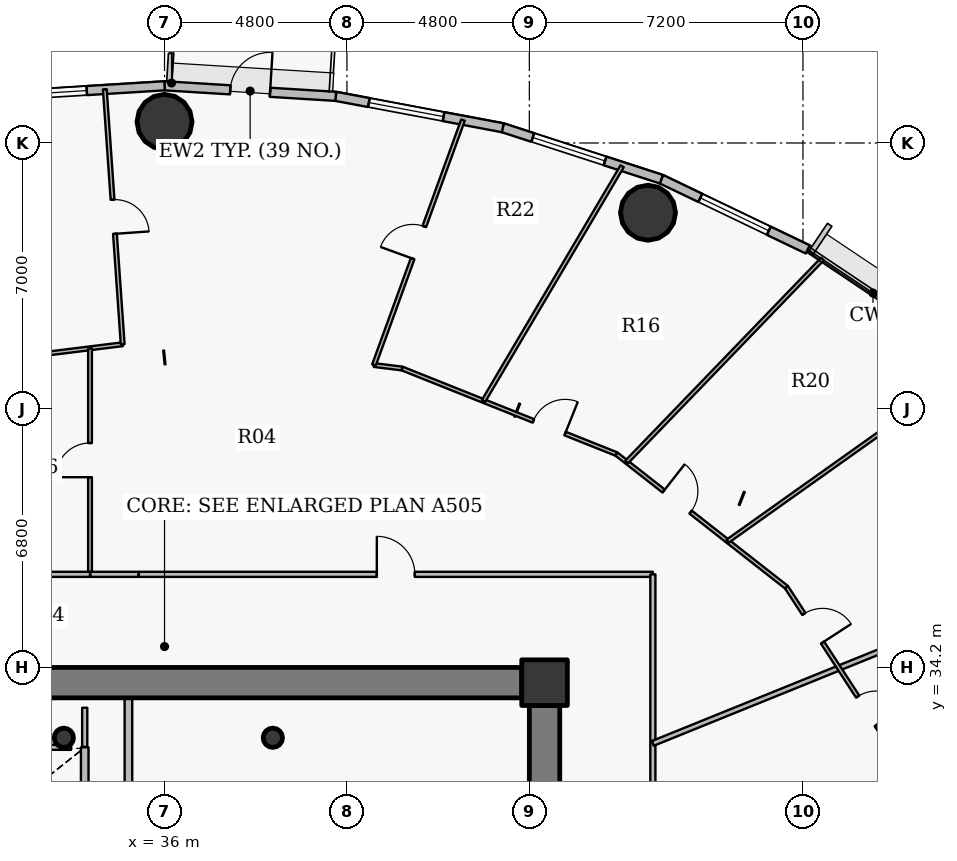
"""IFC4 building model, lengths in metres.
Left out: names, types, materials, properties, quantities, classifications, styles, units other than length and angle.
Written with IfcOpenShell. Run it as: python <this file> out.ifc"""

import sys

from ifc_helpers import new_model, si_unit, direction, frame, frame_2d, origin, origin_2d, place, context, subcontext, project, spatial, rectangle, hollow_circle, extrude, source, transform, mapped, element, fill, save


model = new_model("IFC4")
c1 = context("Model", 3, precision=1e-05, world=origin(), true_north=direction((0.0, 1.0)))
c2 = subcontext(c1, "Body", "Model", "MODEL_VIEW")
j1 = project(units=[si_unit("LENGTHUNIT", "METRE"), si_unit("PLANEANGLEUNIT", "RADIAN")], contexts=[c1])
p1 = place(None, origin())
s1 = spatial("IfcSite", under=j1, at=p1, CompositionType="ELEMENT")
p2 = place(p1, origin())
s2 = spatial("IfcBuilding", under=s1, at=p2, CompositionType="ELEMENT")
p3 = place(p2, frame((0.0, 0.0, 130.95)))
s3 = spatial("IfcBuildingStorey", under=s2, at=p3, CompositionType="ELEMENT", Elevation=130.95)
p4 = place(p3, frame((46.0, 33.8, 0.0), z_axis=(0.0, 0.0, 1.0), x_axis=(1.0, 0.0, 0.0)))
e1 = element("IfcColumn", 1, at=p4, inside=s3, PredefinedType="COLUMN", context=c2, shape_type="SweptSolid", body=[
    extrude(rectangle(XDim=1.2, YDim=1.2, at=origin_2d()), origin(), (0.0, 0.0, 1.0), 3.75),
])
for number, where, z_axis, x_axis in (
    (2, (38.85, 32.35, 0.0), (0.0, 0.0, 1.0), (1.0, 0.0, 0.0)),
    (3, (33.35, 32.35, 0.0), (0.0, 0.0, 1.0), (1.0, 0.0, 0.0)),
):
    element("IfcColumn", number, at=place(p3, frame(where, z_axis=z_axis, x_axis=x_axis)), inside=s3, PredefinedType="COLUMN", context=c2, shape_type="SweptSolid", body=[
        extrude(hollow_circle(Radius=0.254, WallThickness=0.02, at=origin_2d()), origin(), (0.0, 0.0, 1.0), 3.75),
    ])
p5 = place(p3, frame((26.6, 33.8, 0.0), z_axis=(0.0, 0.0, 1.0), x_axis=(1.0, 0.0, 0.0)))
e4 = element("IfcWall", 4, at=p5, inside=s3, PredefinedType="SHEAR", context=c2, shape_type="SweptSolid", body=[
    extrude(rectangle(XDim=18.8, YDim=0.8, at=frame_2d((9.4, 0.0))), origin(), (0.0, 0.0, 1.0), 2.95),
])
p6 = place(p3, frame((46.0, 33.2, 0.0), z_axis=(0.0, 0.0, 1.0), x_axis=(0.0, -1.0, 0.0)))
e5 = element("IfcWall", 5, at=p6, inside=s3, PredefinedType="SHEAR", context=c2, shape_type="SweptSolid", body=[
    extrude(rectangle(XDim=12.4, YDim=0.8, at=frame_2d((6.2, 0.0))), origin(), (0.0, 0.0, 1.0), 2.95),
])
p7 = place(p6, frame((5.79, 0.0, 0.0)))
e6 = element("IfcOpeningElement", 6, at=p7, cuts=e5, PredefinedType="OPENING", context=c2, shape_type="SweptSolid", body=[
    extrude(rectangle(XDim=0.82, YDim=2.1, at=origin_2d()), frame((0.41, 0.41, 1.05), z_axis=(0.0, -1.0, 0.0), x_axis=(1.0, 0.0, 0.0)), (0.0, 0.0, 1.0), 0.82),
])
for number, where, z_axis, x_axis in (
    (7, (48.722, 46.165, 0.0), (0.0, 0.0, 1.0), (1.0, 0.0, 0.0)),
    (8, (36.0, 48.555, 0.0), (0.0, 0.0, 1.0), (1.0, 0.0, 0.0)),
):
    element("IfcColumn", number, at=place(p3, frame(where, z_axis=z_axis, x_axis=x_axis)), inside=s3, PredefinedType="COLUMN", context=c2, shape_type="SweptSolid", body=[
        extrude(hollow_circle(Radius=0.725, WallThickness=0.042, at=origin_2d()), origin(), (0.0, 0.0, 1.0), 3.75),
    ])
p8 = place(p3, frame((49.074, 47.047, 0.0), z_axis=(0.0, 0.0, 1.0), x_axis=(0.901589935876, -0.432591709962, 0.0)))
e9 = element("IfcWall", 9, at=p8, inside=s3, PredefinedType="SOLIDWALL", context=c2, shape_type="SweptSolid", body=[
    extrude(rectangle(XDim=4.272, YDim=0.24, at=frame_2d((2.136, 0.0))), origin(), (0.0, 0.0, 1.0), 3.5),
])
p9 = place(p8, frame((1.136, 0.0, 0.9)))
e10 = element("IfcOpeningElement", 10, at=p9, cuts=e9, PredefinedType="OPENING", context=c2, shape_type="SweptSolid", body=[
    extrude(rectangle(XDim=2.0, YDim=1.75, at=origin_2d()), frame((1.0, 0.13, 0.875), z_axis=(0.0, -1.0, 0.0), x_axis=(1.0, 0.0, 0.0)), (0.0, 0.0, 1.0), 0.26),
])
p10 = place(p3, frame((44.9, 48.401, 0.0), z_axis=(0.0, 0.0, 1.0), x_axis=(0.951211346073, -0.308540070495, 0.0)))
e11 = element("IfcWall", 11, at=p10, inside=s3, PredefinedType="SOLIDWALL", context=c2, shape_type="SweptSolid", body=[
    extrude(rectangle(XDim=4.388, YDim=0.24, at=frame_2d((2.194, 0.0))), origin(), (0.0, 0.0, 1.0), 3.5),
])
p11 = place(p10, frame((0.83, 0.0, 0.9)))
e12 = element("IfcOpeningElement", 12, at=p11, cuts=e11, PredefinedType="OPENING", context=c2, shape_type="SweptSolid", body=[
    extrude(rectangle(XDim=2.0, YDim=1.75, at=origin_2d()), frame((1.0, 0.13, 0.875), z_axis=(0.0, -1.0, 0.0), x_axis=(1.0, 0.0, 0.0)), (0.0, 0.0, 1.0), 0.26),
])
p12 = place(p3, frame((40.506, 49.227, 0.0), z_axis=(0.0, 0.0, 1.0), x_axis=(0.982789252177, -0.184730305596, 0.0)))
e13 = element("IfcWall", 13, at=p12, inside=s3, PredefinedType="SOLIDWALL", context=c2, shape_type="SweptSolid", body=[
    extrude(rectangle(XDim=4.471, YDim=0.24, at=frame_2d((2.235, 0.0))), origin(), (0.0, 0.0, 1.0), 3.5),
])
p13 = place(p12, frame((0.886, 0.0, 0.9)))
e14 = element("IfcOpeningElement", 14, at=p13, cuts=e13, PredefinedType="OPENING", context=c2, shape_type="SweptSolid", body=[
    extrude(rectangle(XDim=2.0, YDim=1.75, at=origin_2d()), frame((1.0, 0.13, 0.875), z_axis=(0.0, -1.0, 0.0), x_axis=(1.0, 0.0, 0.0)), (0.0, 0.0, 1.0), 0.26),
])
p14 = place(p3, frame((36.0, 49.505, 0.0), z_axis=(0.0, 0.0, 1.0), x_axis=(0.998107531589, -0.061492726276, 0.0)))
e15 = element("IfcWall", 15, at=p14, inside=s3, PredefinedType="SOLIDWALL", context=c2, shape_type="SweptSolid", body=[
    extrude(rectangle(XDim=4.514, YDim=0.24, at=frame_2d((2.257, 0.0))), origin(), (0.0, 0.0, 1.0), 3.5),
])
p15 = place(p14, frame((1.732, 0.0, 0.0)))
e16 = element("IfcOpeningElement", 16, at=p15, cuts=e15, PredefinedType="OPENING", context=c2, shape_type="SweptSolid", body=[
    extrude(rectangle(XDim=1.05, YDim=2.15, at=origin_2d()), frame((0.525, 0.13, 1.075), z_axis=(0.0, -1.0, 0.0), x_axis=(1.0, 0.0, 0.0)), (0.0, 0.0, 1.0), 0.26),
])
p16 = place(p3, frame((31.494, 49.227, 0.0), z_axis=(0.0, 0.0, 1.0), x_axis=(0.998107531589, 0.061492726276, 0.0)))
e17 = element("IfcWall", 17, at=p16, inside=s3, PredefinedType="SOLIDWALL", context=c2, shape_type="SweptSolid", body=[
    extrude(rectangle(XDim=4.514, YDim=0.24, at=frame_2d((2.257, 0.0))), origin(), (0.0, 0.0, 1.0), 3.5),
])
p17 = place(p16, frame((0.865, 0.0, 0.9)))
e18 = element("IfcOpeningElement", 18, at=p17, cuts=e17, PredefinedType="OPENING", context=c2, shape_type="SweptSolid", body=[
    extrude(rectangle(XDim=1.6, YDim=1.75, at=origin_2d()), frame((0.8, 0.13, 0.875), z_axis=(0.0, -1.0, 0.0), x_axis=(1.0, 0.0, 0.0)), (0.0, 0.0, 1.0), 0.26),
])
p18 = place(p3, frame((23.15, 36.65, 0.0), z_axis=(0.0, 0.0, 1.0), x_axis=(1.0, 0.0, 0.0)))
e19 = element("IfcWall", 19, at=p18, inside=s3, PredefinedType="PARTITIONING", context=c2, shape_type="SweptSolid", body=[
    extrude(rectangle(XDim=10.889, YDim=0.135, at=frame_2d((5.445, 0.0))), origin(), (0.0, 0.0, 1.0), 2.935),
])
p19 = place(p18, frame((3.354, 0.0, 0.0)))
e20 = element("IfcOpeningElement", 20, at=p19, cuts=e19, PredefinedType="OPENING", context=c2, shape_type="SweptSolid", body=[
    extrude(rectangle(XDim=1.05, YDim=2.15, at=origin_2d()), frame((0.525, 0.078, 1.075), z_axis=(0.0, -1.0, 0.0), x_axis=(1.0, 0.0, 0.0)), (0.0, 0.0, 1.0), 0.155),
])
p20 = place(p3, frame((29.749, 42.066, 0.0), z_axis=(0.0, 0.0, 1.0), x_axis=(0.992399697935, 0.123056245428, 0.0)))
e21 = element("IfcWall", 21, at=p20, inside=s3, PredefinedType="PARTITIONING", context=c2, shape_type="SweptSolid", body=[
    extrude(rectangle(XDim=5.19, YDim=0.1, at=frame_2d((2.595, 0.0))), origin(), (0.0, 0.0, 1.0), 2.935),
])
p21 = place(p3, frame((33.9, 20.6, 0.0), z_axis=(0.0, 0.0, 1.0), x_axis=(0.0, 1.0, 0.0)))
e22 = element("IfcWall", 22, at=p21, inside=s3, PredefinedType="PARTITIONING", context=c2, shape_type="SweptSolid", body=[
    extrude(rectangle(XDim=11.5, YDim=0.2, at=frame_2d((5.75, 0.0))), origin(), (0.0, 0.0, 1.0), 3.085),
])
p22 = place(p3, frame((34.039, 36.714, 0.0), z_axis=(0.0, 0.0, 1.0), x_axis=(0.0, 1.0, 0.0)))
e23 = element("IfcWall", 23, at=p22, inside=s3, PredefinedType="PARTITIONING", context=c2, shape_type="SweptSolid", body=[
    extrude(rectangle(XDim=5.884, YDim=0.1, at=frame_2d((2.942, 0.0))), origin(), (0.0, 0.0, 1.0), 2.985),
])
p23 = place(p22, frame((2.492, 0.0, 0.0)))
e24 = element("IfcOpeningElement", 24, at=p23, cuts=e23, PredefinedType="OPENING", context=c2, shape_type="SweptSolid", body=[
    extrude(rectangle(XDim=0.9, YDim=2.1, at=origin_2d()), frame((0.45, 0.06, 1.05), z_axis=(0.0, -1.0, 0.0), x_axis=(1.0, 0.0, 0.0)), (0.0, 0.0, 1.0), 0.12),
])
p24 = place(p3, frame((34.429, 49.413, 0.0), z_axis=(0.0, 0.0, 1.0), x_axis=(0.069954481801, -0.99755018444, 0.0)))
e25 = element("IfcWall", 25, at=p24, inside=s3, PredefinedType="PARTITIONING", context=c2, shape_type="SweptSolid", body=[
    extrude(rectangle(XDim=6.725, YDim=0.1, at=frame_2d((3.363, 0.0))), origin(), (0.0, 0.0, 1.0), 2.935),
])
p25 = place(p24, frame((2.913, 0.0, 0.0)))
e26 = element("IfcOpeningElement", 26, at=p25, cuts=e25, PredefinedType="OPENING", context=c2, shape_type="SweptSolid", body=[
    extrude(rectangle(XDim=0.9, YDim=2.1, at=origin_2d()), frame((0.45, 0.06, 1.05), z_axis=(0.0, -1.0, 0.0), x_axis=(1.0, 0.0, 0.0)), (0.0, 0.0, 1.0), 0.12),
])
p26 = place(p3, frame((35.05, 31.05, 0.0), z_axis=(0.0, 0.0, 1.0), x_axis=(0.0, 1.0, 0.0)))
e27 = element("IfcWall", 27, at=p26, inside=s3, PredefinedType="PARTITIONING", context=c2, shape_type="SweptSolid", body=[
    extrude(rectangle(XDim=2.35, YDim=0.2, at=frame_2d((1.175, 0.0))), origin(), (0.0, 0.0, 1.0), 3.085),
])
p27 = place(p3, frame((35.323, 36.65, 0.0), z_axis=(0.0, 0.0, 1.0), x_axis=(1.0, 0.0, 0.0)))
e28 = element("IfcWall", 28, at=p27, inside=s3, PredefinedType="PARTITIONING", context=c2, shape_type="SweptSolid", body=[
    extrude(rectangle(XDim=13.527, YDim=0.135, at=frame_2d((6.763, 0.0))), origin(), (0.0, 0.0, 1.0), 2.935),
])
p28 = place(p27, frame((6.263, 0.0, 0.0)))
e29 = element("IfcOpeningElement", 29, at=p28, cuts=e28, PredefinedType="OPENING", context=c2, shape_type="SweptSolid", body=[
    extrude(rectangle(XDim=1.0, YDim=2.15, at=origin_2d()), frame((0.5, 0.078, 1.075), z_axis=(0.0, -1.0, 0.0), x_axis=(1.0, 0.0, 0.0)), (0.0, 0.0, 1.0), 0.155),
])
p29 = place(p3, frame((41.511, 42.157, 0.0), z_axis=(0.0, 0.0, 1.0), x_axis=(0.992403212837, -0.123027895822, 0.0)))
e30 = element("IfcWall", 30, at=p29, inside=s3, PredefinedType="PARTITIONING", context=c2, shape_type="SweptSolid", body=[
    extrude(rectangle(XDim=0.746, YDim=0.1, at=frame_2d((0.373, 0.0))), origin(), (0.0, 0.0, 1.0), 3.5),
])
p30 = place(p3, frame((41.511, 42.157, 0.0), z_axis=(0.0, 0.0, 1.0), x_axis=(0.341680179237, 0.939816287961, 0.0)))
e31 = element("IfcWall", 31, at=p30, inside=s3, PredefinedType="PARTITIONING", context=c2, shape_type="SweptSolid", body=[
    extrude(rectangle(XDim=6.858, YDim=0.1, at=frame_2d((3.429, 0.0))), origin(), (0.0, 0.0, 1.0), 2.935),
])
p31 = place(p30, frame((2.979, 0.0, 0.0)))
e32 = element("IfcOpeningElement", 32, at=p31, cuts=e31, PredefinedType="OPENING", context=c2, shape_type="SweptSolid", body=[
    extrude(rectangle(XDim=0.9, YDim=2.1, at=origin_2d()), frame((0.45, 0.06, 1.05), z_axis=(0.0, -1.0, 0.0), x_axis=(1.0, 0.0, 0.0)), (0.0, 0.0, 1.0), 0.12),
])
p32 = place(p3, frame((42.251, 42.066, 0.0), z_axis=(0.0, 0.0, 1.0), x_axis=(0.928803554156, -0.370572473055, 0.0)))
e33 = element("IfcWall", 33, at=p32, inside=s3, PredefinedType="PARTITIONING", context=c2, shape_type="SweptSolid", body=[
    extrude(rectangle(XDim=6.072, YDim=0.1, at=frame_2d((3.036, 0.0))), origin(), (0.0, 0.0, 1.0), 2.935),
])
p33 = place(p32, frame((3.719, 0.0, 0.0)))
e34 = element("IfcOpeningElement", 34, at=p33, cuts=e33, PredefinedType="OPENING", context=c2, shape_type="SweptSolid", body=[
    extrude(rectangle(XDim=0.9, YDim=2.1, at=origin_2d()), frame((0.45, 0.06, 1.05), z_axis=(0.0, -1.0, 0.0), x_axis=(1.0, 0.0, 0.0)), (0.0, 0.0, 1.0), 0.12),
])
p34 = place(p3, frame((44.394, 41.211, 0.0), z_axis=(0.0, 0.0, 1.0), x_axis=(0.508542397454, 0.861036950422, 0.0)))
e35 = element("IfcWall", 35, at=p34, inside=s3, PredefinedType="PARTITIONING", context=c2, shape_type="SweptSolid", body=[
    extrude(rectangle(XDim=7.173, YDim=0.1, at=frame_2d((3.587, 0.0))), origin(), (0.0, 0.0, 1.0), 2.935),
])
p35 = place(p3, frame((47.891, 39.816, 0.0), z_axis=(0.0, 0.0, 1.0), x_axis=(0.787345480673, -0.616512038864, 0.0)))
e36 = element("IfcWall", 36, at=p35, inside=s3, PredefinedType="PARTITIONING", context=c2, shape_type="SweptSolid", body=[
    extrude(rectangle(XDim=5.685, YDim=0.1, at=frame_2d((2.843, 0.0))), origin(), (0.0, 0.0, 1.0), 2.935),
])
p36 = place(p35, frame((1.58, 0.0, 0.0)))
e37 = element("IfcOpeningElement", 37, at=p36, cuts=e36, PredefinedType="OPENING", context=c2, shape_type="SweptSolid", body=[
    extrude(rectangle(XDim=0.9, YDim=2.1, at=origin_2d()), frame((0.45, 0.06, 1.05), z_axis=(0.0, -1.0, 0.0), x_axis=(1.0, 0.0, 0.0)), (0.0, 0.0, 1.0), 0.12),
])
p37 = place(p3, frame((48.16, 39.605, 0.0), z_axis=(0.0, 0.0, 1.0), x_axis=(0.694278615756, 0.719706331571, 0.0)))
e38 = element("IfcWall", 38, at=p37, inside=s3, PredefinedType="PARTITIONING", context=c2, shape_type="SweptSolid", body=[
    extrude(rectangle(XDim=7.422, YDim=0.1, at=frame_2d((3.711, 0.0))), origin(), (0.0, 0.0, 1.0), 2.935),
])
p38 = place(p3, frame((48.85, 17.35, 0.0), z_axis=(0.0, 0.0, 1.0), x_axis=(0.0, 1.0, 0.0)))
e39 = element("IfcWall", 39, at=p38, inside=s3, PredefinedType="PARTITIONING", context=c2, shape_type="SweptSolid", body=[
    extrude(rectangle(XDim=19.3, YDim=0.135, at=frame_2d((9.65, 0.0))), origin(), (0.0, 0.0, 1.0), 2.935),
])
p39 = place(p38, frame((6.946, 0.0, 0.0)))
e40 = element("IfcOpeningElement", 40, at=p39, cuts=e39, PredefinedType="OPENING", context=c2, shape_type="SweptSolid", body=[
    extrude(rectangle(XDim=1.0, YDim=2.15, at=origin_2d()), frame((0.5, 0.078, 1.075), z_axis=(0.0, -1.0, 0.0), x_axis=(1.0, 0.0, 0.0)), (0.0, 0.0, 1.0), 0.155),
])
p40 = place(p3, frame((48.85, 32.202, 0.0), z_axis=(0.0, 0.0, 1.0), x_axis=(0.92691714139, 0.375266056281, 0.0)))
e41 = element("IfcWall", 41, at=p40, inside=s3, PredefinedType="PARTITIONING", context=c2, shape_type="SweptSolid", body=[
    extrude(rectangle(XDim=13.696, YDim=0.135, at=frame_2d((6.848, 0.0))), origin(), (0.0, 0.0, 1.0), 2.935),
])
p41 = place(p3, frame((50.819, 37.523, 0.0), z_axis=(0.0, 0.0, 1.0), x_axis=(0.815321486624, 0.579008526233, 0.0)))
e42 = element("IfcWall", 42, at=p41, inside=s3, PredefinedType="PARTITIONING", context=c2, shape_type="SweptSolid", body=[
    extrude(rectangle(XDim=7.89, YDim=0.1, at=frame_2d((3.945, 0.0))), origin(), (0.0, 0.0, 1.0), 2.935),
])
p42 = place(p3, frame((52.366, 36.311, 0.0), z_axis=(0.0, 0.0, 1.0), x_axis=(0.545405249109, -0.838172484781, 0.0)))
e43 = element("IfcWall", 43, at=p42, inside=s3, PredefinedType="PARTITIONING", context=c2, shape_type="SweptSolid", body=[
    extrude(rectangle(XDim=5.269, YDim=0.1, at=frame_2d((2.634, 0.0))), origin(), (0.0, 0.0, 1.0), 2.935),
])
p43 = place(p42, frame((3.432, 0.0, 0.0)))
e44 = element("IfcOpeningElement", 44, at=p43, cuts=e43, PredefinedType="OPENING", context=c2, shape_type="SweptSolid", body=[
    extrude(rectangle(XDim=0.9, YDim=2.1, at=origin_2d()), frame((0.45, 0.06, 1.05), z_axis=(0.0, -1.0, 0.0), x_axis=(1.0, 0.0, 0.0)), (0.0, 0.0, 1.0), 0.12),
])
p44 = place(p42, frame((0.838, 0.0, 0.0)))
e45 = element("IfcOpeningElement", 45, at=p44, cuts=e43, PredefinedType="OPENING", context=c2, shape_type="SweptSolid", body=[
    extrude(rectangle(XDim=0.9, YDim=2.1, at=origin_2d()), frame((0.45, 0.06, 1.05), z_axis=(0.0, -1.0, 0.0), x_axis=(1.0, 0.0, 0.0)), (0.0, 0.0, 1.0), 0.12),
])
p45 = place(p3, frame((32.36, 32.1, 0.0), z_axis=(0.0, 0.0, 1.0), x_axis=(1.0, 0.0, 0.0)))
e46 = element("IfcWall", 46, at=p45, inside=s3, PredefinedType="PARTITIONING", context=c2, shape_type="SweptSolid", body=[
    extrude(rectangle(XDim=1.18, YDim=0.135, at=frame_2d((0.59, 0.0))), origin(), (0.0, 0.0, 1.0), 3.085),
])
p46 = place(p3, frame((33.9, 32.11, 0.0), z_axis=(0.0, 0.0, 1.0), x_axis=(0.0, 1.0, 0.0)))
e47 = element("IfcWall", 47, at=p46, inside=s3, PredefinedType="PARTITIONING", context=c2, shape_type="SweptSolid", body=[
    extrude(rectangle(XDim=1.03, YDim=0.135, at=frame_2d((0.515, 0.0))), origin(), (0.0, 0.0, 1.0), 3.085),
])
p47 = place(p3, frame((34.049, 36.65, 0.0), z_axis=(0.0, 0.0, 1.0), x_axis=(1.0, 0.0, 0.0)))
e48 = element("IfcWall", 48, at=p47, inside=s3, PredefinedType="PARTITIONING", context=c2, shape_type="SweptSolid", body=[
    extrude(rectangle(XDim=1.264, YDim=0.135, at=frame_2d((0.632, 0.0))), origin(), (0.0, 0.0, 1.0), 3.5),
])
p48 = place(p3, frame((46.4, 34.2, 0.0), z_axis=(0.0, 0.0, 1.0), x_axis=(-1.0, 0.0, 0.0)))
e49 = element("IfcWall", 49, at=p48, inside=s3, PredefinedType="PARTITIONING", context=c2, shape_type="SweptSolid", body=[
    extrude(rectangle(XDim=0.99, YDim=0.135, at=frame_2d((0.495, 0.0))), origin(), (0.0, 0.0, 1.0), 2.935),
])
p49 = place(p3, frame((46.4, 33.21, 0.0), z_axis=(0.0, 0.0, 1.0), x_axis=(0.0, 1.0, 0.0)))
e50 = element("IfcWall", 50, at=p49, inside=s3, PredefinedType="PARTITIONING", context=c2, shape_type="SweptSolid", body=[
    extrude(rectangle(XDim=0.683, YDim=0.135, at=frame_2d((0.341, 0.0))), origin(), (0.0, 0.0, 1.0), 3.5),
])
m1 = source(origin(), c2, "Body", "SweptSolid", [
    extrude(rectangle(XDim=2.0, YDim=1.75, at=origin_2d()), frame((1.0, 0.03, 0.875), z_axis=(0.0, -1.0, 0.0), x_axis=(1.0, 0.0, 0.0)), (0.0, 0.0, 1.0), 0.06),
])
p50 = place(p9, origin())
e51 = element("IfcWindow", 51, at=p50, inside=s3, PartitioningType="DOUBLE_PANEL_VERTICAL", PredefinedType="WINDOW", context=c2, shape_type="MappedRepresentation", body=[
    mapped(m1, transform((0.0, 0.0, 0.0), x_axis=(1.0, 0.0, 0.0), y_axis=(0.0, 1.0, 0.0), z_axis=(0.0, 0.0, 1.0), scale=1.0)),
])
fill(e10, e51)
p51 = place(p11, origin())
e52 = element("IfcWindow", 52, at=p51, inside=s3, PartitioningType="DOUBLE_PANEL_VERTICAL", PredefinedType="WINDOW", context=c2, shape_type="MappedRepresentation", body=[
    mapped(m1, transform((0.0, 0.0, 0.0), x_axis=(1.0, 0.0, 0.0), y_axis=(0.0, 1.0, 0.0), z_axis=(0.0, 0.0, 1.0), scale=1.0)),
])
fill(e12, e52)
p52 = place(p13, origin())
e53 = element("IfcWindow", 53, at=p52, inside=s3, PartitioningType="DOUBLE_PANEL_VERTICAL", PredefinedType="WINDOW", context=c2, shape_type="MappedRepresentation", body=[
    mapped(m1, transform((0.0, 0.0, 0.0), x_axis=(1.0, 0.0, 0.0), y_axis=(0.0, 1.0, 0.0), z_axis=(0.0, 0.0, 1.0), scale=1.0)),
])
fill(e14, e53)
m2 = source(origin(), c2, "Body", "SweptSolid", [
    extrude(rectangle(XDim=1.05, YDim=2.15, at=origin_2d()), frame((0.525, 0.025, 1.075), z_axis=(0.0, -1.0, 0.0), x_axis=(1.0, 0.0, 0.0)), (0.0, 0.0, 1.0), 0.05),
])
p53 = place(p15, origin())
e54 = element("IfcDoor", 54, at=p53, inside=s3, OperationType="SINGLE_SWING_RIGHT", PredefinedType="DOOR", context=c2, shape_type="MappedRepresentation", body=[
    mapped(m2, transform((0.0, 0.0, 0.0), x_axis=(1.0, 0.0, 0.0), y_axis=(0.0, 1.0, 0.0), z_axis=(0.0, 0.0, 1.0), scale=1.0)),
])
fill(e16, e54)
m3 = source(origin(), c2, "Body", "SweptSolid", [
    extrude(rectangle(XDim=1.6, YDim=1.75, at=origin_2d()), frame((0.8, 0.03, 0.875), z_axis=(0.0, -1.0, 0.0), x_axis=(1.0, 0.0, 0.0)), (0.0, 0.0, 1.0), 0.06),
])
p54 = place(p17, origin())
e55 = element("IfcWindow", 55, at=p54, inside=s3, PartitioningType="DOUBLE_PANEL_VERTICAL", PredefinedType="WINDOW", context=c2, shape_type="MappedRepresentation", body=[
    mapped(m3, transform((0.0, 0.0, 0.0), x_axis=(1.0, 0.0, 0.0), y_axis=(0.0, 1.0, 0.0), z_axis=(0.0, 0.0, 1.0), scale=1.0)),
])
fill(e18, e55)
m4 = source(origin(), c2, "Body", "SweptSolid", [
    extrude(rectangle(XDim=0.9, YDim=2.1, at=origin_2d()), frame((0.45, 0.025, 1.05), z_axis=(0.0, -1.0, 0.0), x_axis=(1.0, 0.0, 0.0)), (0.0, 0.0, 1.0), 0.05),
])
p55 = place(p43, origin())
e56 = element("IfcDoor", 56, at=p55, inside=s3, OperationType="SINGLE_SWING_RIGHT", PredefinedType="DOOR", context=c2, shape_type="MappedRepresentation", body=[
    mapped(m4, transform((0.0, 0.0, 0.0), x_axis=(1.0, 0.0, 0.0), y_axis=(0.0, 1.0, 0.0), z_axis=(0.0, 0.0, 1.0), scale=1.0)),
])
fill(e44, e56)
m5 = source(origin(), c2, "Body", "SweptSolid", [
    extrude(rectangle(XDim=1.0, YDim=2.15, at=origin_2d()), frame((0.5, 0.025, 1.075), z_axis=(0.0, -1.0, 0.0), x_axis=(1.0, 0.0, 0.0)), (0.0, 0.0, 1.0), 0.05),
])
p56 = place(p28, origin())
e57 = element("IfcDoor", 57, at=p56, inside=s3, OperationType="SINGLE_SWING_LEFT", PredefinedType="DOOR", context=c2, shape_type="MappedRepresentation", body=[
    mapped(m5, transform((0.0, 0.0, 0.0), x_axis=(1.0, 0.0, 0.0), y_axis=(0.0, 1.0, 0.0), z_axis=(0.0, 0.0, 1.0), scale=1.0)),
])
fill(e29, e57)
p57 = place(p44, origin())
e58 = element("IfcDoor", 58, at=p57, inside=s3, OperationType="SINGLE_SWING_RIGHT", PredefinedType="DOOR", context=c2, shape_type="MappedRepresentation", body=[
    mapped(m4, transform((0.0, 0.0, 0.0), x_axis=(1.0, 0.0, 0.0), y_axis=(0.0, 1.0, 0.0), z_axis=(0.0, 0.0, 1.0), scale=1.0)),
])
fill(e45, e58)
p58 = place(p36, origin())
e59 = element("IfcDoor", 59, at=p58, inside=s3, OperationType="SINGLE_SWING_LEFT", PredefinedType="DOOR", context=c2, shape_type="MappedRepresentation", body=[
    mapped(m4, transform((0.0, 0.0, 0.0), x_axis=(1.0, 0.0, 0.0), y_axis=(0.0, 1.0, 0.0), z_axis=(0.0, 0.0, 1.0), scale=1.0)),
])
fill(e37, e59)
p59 = place(p33, origin())
e60 = element("IfcDoor", 60, at=p59, inside=s3, OperationType="SINGLE_SWING_RIGHT", PredefinedType="DOOR", context=c2, shape_type="MappedRepresentation", body=[
    mapped(m4, transform((0.0, 0.0, 0.0), x_axis=(1.0, 0.0, 0.0), y_axis=(0.0, 1.0, 0.0), z_axis=(0.0, 0.0, 1.0), scale=1.0)),
])
fill(e34, e60)
p60 = place(p31, origin())
e61 = element("IfcDoor", 61, at=p60, inside=s3, OperationType="SINGLE_SWING_LEFT", PredefinedType="DOOR", context=c2, shape_type="MappedRepresentation", body=[
    mapped(m4, transform((0.0, 0.0, 0.0), x_axis=(1.0, 0.0, 0.0), y_axis=(0.0, 1.0, 0.0), z_axis=(0.0, 0.0, 1.0), scale=1.0)),
])
fill(e32, e61)
p61 = place(p25, origin())
e62 = element("IfcDoor", 62, at=p61, inside=s3, OperationType="SINGLE_SWING_RIGHT", PredefinedType="DOOR", context=c2, shape_type="MappedRepresentation", body=[
    mapped(m4, transform((0.0, 0.0, 0.0), x_axis=(1.0, 0.0, 0.0), y_axis=(0.0, 1.0, 0.0), z_axis=(0.0, 0.0, 1.0), scale=1.0)),
])
fill(e26, e62)
p62 = place(p23, origin())
e63 = element("IfcDoor", 63, at=p62, inside=s3, OperationType="SINGLE_SWING_LEFT", PredefinedType="DOOR", context=c2, shape_type="MappedRepresentation", body=[
    mapped(m4, transform((0.0, 0.0, 0.0), x_axis=(1.0, 0.0, 0.0), y_axis=(0.0, 1.0, 0.0), z_axis=(0.0, 0.0, 1.0), scale=1.0)),
])
fill(e24, e63)
save(model, sys.argv[1])
